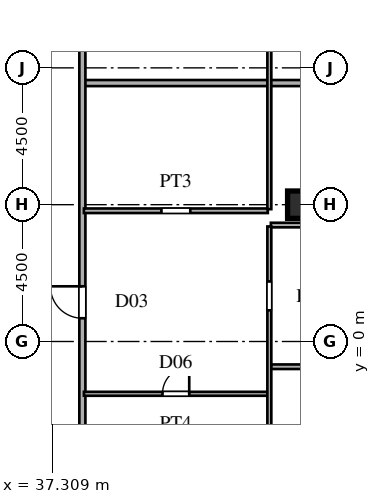
"""IFC4 building model, lengths in metres.
Left out: names, types, materials, properties, quantities, classifications, styles, units other than length and angle.
Written with IfcOpenShell. Run it as: python <this file> out.ifc"""

import sys

from ifc_helpers import new_model, si_unit, direction, frame, frame_2d, origin, origin_2d, place, context, subcontext, project, spatial, rectangle, i_section, extrude, source, transform, mapped, element, fill, save


model = new_model("IFC4")
c1 = context("Model", 3, precision=1e-05, world=origin(), true_north=direction((0.0, 1.0)))
c2 = subcontext(c1, "Body", "Model", "MODEL_VIEW")
j1 = project(units=[si_unit("LENGTHUNIT", "METRE"), si_unit("PLANEANGLEUNIT", "RADIAN")], contexts=[c1])
p1 = place(None, origin())
s1 = spatial("IfcSite", under=j1, at=p1, CompositionType="ELEMENT")
p2 = place(p1, origin())
s2 = spatial("IfcBuilding", under=s1, at=p2, CompositionType="ELEMENT")
p3 = place(p2, frame((0.0, 0.0, 54.9)))
s3 = spatial("IfcBuildingStorey", under=s2, at=p3, CompositionType="ELEMENT", Elevation=54.9)
m1 = source(origin(), c2, "Body", "SweptSolid", [
    extrude(i_section(OverallWidth=0.9, OverallDepth=0.9, WebThickness=0.036, FlangeThickness=0.055, at=origin_2d()), origin(), (0.0, 0.0, 1.0), 3.6),
])
p4 = place(p3, frame((45.5, 4.5, 0.0), z_axis=(0.0, 0.0, 1.0), x_axis=(1.0, 0.0, 0.0)))
e1 = element("IfcColumn", 1, at=p4, inside=s3, PredefinedType="COLUMN", context=c2, shape_type="MappedRepresentation", body=[
    mapped(m1, transform((0.0, 0.0, 0.0), scale=1.0)),
])
p5 = place(p3, frame((38.35, -1.72, 0.0), z_axis=(0.0, 0.0, 1.0), x_axis=(1.0, 0.0, 0.0)))
e2 = element("IfcWall", 2, at=p5, inside=s3, PredefinedType="PARTITIONING", context=c2, shape_type="SweptSolid", body=[
    extrude(rectangle(XDim=6.05, YDim=0.13, at=frame_2d((3.025, 0.0))), origin(), (0.0, 0.0, 1.0), 3.38),
])
p6 = place(p5, frame((2.585, 0.0, 0.0)))
e3 = element("IfcOpeningElement", 3, at=p6, cuts=e2, PredefinedType="OPENING", context=c2, shape_type="SweptSolid", body=[
    extrude(rectangle(XDim=0.88, YDim=2.1, at=frame_2d((0.44, 1.05))), frame((0.0, 0.075, 0.0), z_axis=(0.0, -1.0, 0.0), x_axis=(1.0, 0.0, 0.0)), (0.0, 0.0, 1.0), 0.15),
])
p7 = place(p3, frame((44.5, -0.83, 0.0), z_axis=(0.0, 0.0, 1.0), x_axis=(1.0, 0.0, 0.0)))
e4 = element("IfcWall", 4, at=p7, inside=s3, PredefinedType="PARTITIONING", context=c2, shape_type="SweptSolid", body=[
    extrude(rectangle(XDim=28.035, YDim=0.15, at=frame_2d((14.018, 0.0))), origin(), (0.0, 0.0, 1.0), 3.38),
])
p8 = place(p7, frame((4.5, 0.0, 0.0)))
e5 = element("IfcOpeningElement", 5, at=p8, cuts=e4, PredefinedType="OPENING", context=c2, shape_type="SweptSolid", body=[
    extrude(rectangle(XDim=0.95, YDim=2.15, at=frame_2d((0.475, 1.075))), frame((0.0, 0.085, 0.0), z_axis=(0.0, -1.0, 0.0), x_axis=(1.0, 0.0, 0.0)), (0.0, 0.0, 1.0), 0.17),
])
p9 = place(p7, frame((12.375, 0.0, 0.0)))
e6 = element("IfcOpeningElement", 6, at=p9, cuts=e4, PredefinedType="OPENING", context=c2, shape_type="SweptSolid", body=[
    extrude(rectangle(XDim=0.95, YDim=2.15, at=frame_2d((0.475, 1.075))), frame((0.0, 0.085, 0.0), z_axis=(0.0, -1.0, 0.0), x_axis=(1.0, 0.0, 0.0)), (0.0, 0.0, 1.0), 0.17),
])
p10 = place(p3, frame((44.5, 3.83, 0.0), z_axis=(0.0, 0.0, 1.0), x_axis=(1.0, 0.0, 0.0)))
e7 = element("IfcWall", 7, at=p10, inside=s3, PredefinedType="PARTITIONING", context=c2, shape_type="SweptSolid", body=[
    extrude(rectangle(XDim=28.035, YDim=0.15, at=frame_2d((14.018, 0.0))), origin(), (0.0, 0.0, 1.0), 3.38),
])
p11 = place(p10, frame((4.5, 0.0, 0.0)))
e8 = element("IfcOpeningElement", 8, at=p11, cuts=e7, PredefinedType="OPENING", context=c2, shape_type="SweptSolid", body=[
    extrude(rectangle(XDim=0.95, YDim=2.15, at=frame_2d((0.475, 1.075))), frame((0.0, 0.085, 0.0), z_axis=(0.0, -1.0, 0.0), x_axis=(1.0, 0.0, 0.0)), (0.0, 0.0, 1.0), 0.17),
])
p12 = place(p10, frame((12.375, 0.0, 0.0)))
e9 = element("IfcOpeningElement", 9, at=p12, cuts=e7, PredefinedType="OPENING", context=c2, shape_type="SweptSolid", body=[
    extrude(rectangle(XDim=0.95, YDim=2.15, at=frame_2d((0.475, 1.075))), frame((0.0, 0.085, 0.0), z_axis=(0.0, -1.0, 0.0), x_axis=(1.0, 0.0, 0.0)), (0.0, 0.0, 1.0), 0.17),
])
p13 = place(p3, frame((38.35, 4.3, 0.0), z_axis=(0.0, 0.0, 1.0), x_axis=(1.0, 0.0, 0.0)))
e10 = element("IfcWall", 10, at=p13, inside=s3, PredefinedType="PARTITIONING", context=c2, shape_type="SweptSolid", body=[
    extrude(rectangle(XDim=6.05, YDim=0.15, at=frame_2d((3.025, 0.0))), origin(), (0.0, 0.0, 1.0), 3.38),
])
p14 = place(p13, frame((2.55, 0.0, 0.0)))
e11 = element("IfcOpeningElement", 11, at=p14, cuts=e10, PredefinedType="OPENING", context=c2, shape_type="SweptSolid", body=[
    extrude(rectangle(XDim=0.95, YDim=2.15, at=frame_2d((0.475, 1.075))), frame((0.0, 0.085, 0.0), z_axis=(0.0, -1.0, 0.0), x_axis=(1.0, 0.0, 0.0)), (0.0, 0.0, 1.0), 0.17),
])
p15 = place(p3, frame((38.38, 8.5, 0.0), z_axis=(0.0, 0.0, 1.0), x_axis=(1.0, 0.0, 0.0)))
e12 = element("IfcWall", 12, at=p15, inside=s3, PredefinedType="PARTITIONING", context=c2, shape_type="SweptSolid", body=[
    extrude(rectangle(XDim=34.125, YDim=0.2, at=frame_2d((17.062, 0.0))), origin(), (0.0, 0.0, 1.0), 3.38),
])
p16 = place(p3, frame((38.3, -15.515, 0.0), z_axis=(0.0, 0.0, 1.0), x_axis=(0.0, 1.0, 0.0)))
e13 = element("IfcWall", 13, at=p16, inside=s3, PredefinedType="PARTITIONING", context=c2, shape_type="SweptSolid", body=[
    extrude(rectangle(XDim=31.03, YDim=0.2, at=frame_2d((15.515, 0.0))), origin(), (0.0, 0.0, 1.0), 3.38),
])
p17 = place(p16, frame((4.413, 0.0, 0.0)))
e14 = element("IfcOpeningElement", 14, at=p17, cuts=e13, PredefinedType="OPENING", context=c2, shape_type="SweptSolid", body=[
    extrude(rectangle(XDim=1.05, YDim=2.25, at=frame_2d((0.525, 1.125))), frame((0.0, 0.11, 0.0), z_axis=(0.0, -1.0, 0.0), x_axis=(1.0, 0.0, 0.0)), (0.0, 0.0, 1.0), 0.22),
])
p18 = place(p16, frame((16.28, 0.0, 0.0)))
e15 = element("IfcOpeningElement", 15, at=p18, cuts=e13, PredefinedType="OPENING", context=c2, shape_type="SweptSolid", body=[
    extrude(rectangle(XDim=1.05, YDim=2.25, at=frame_2d((0.525, 1.125))), frame((0.0, 0.11, 0.0), z_axis=(0.0, -1.0, 0.0), x_axis=(1.0, 0.0, 0.0)), (0.0, 0.0, 1.0), 0.22),
])
p19 = place(p16, frame((27.635, 0.0, 0.0)))
e16 = element("IfcOpeningElement", 16, at=p19, cuts=e13, PredefinedType="OPENING", context=c2, shape_type="SweptSolid", body=[
    extrude(rectangle(XDim=1.05, YDim=2.25, at=frame_2d((0.525, 1.125))), frame((0.0, 0.11, 0.0), z_axis=(0.0, -1.0, 0.0), x_axis=(1.0, 0.0, 0.0)), (0.0, 0.0, 1.0), 0.22),
])
p20 = place(p3, frame((44.45, -21.389, 0.0), z_axis=(0.0, 0.0, 1.0), x_axis=(0.0, 1.0, 0.0)))
e17 = element("IfcWall", 17, at=p20, inside=s3, PredefinedType="PARTITIONING", context=c2, shape_type="SweptSolid", body=[
    extrude(rectangle(XDim=25.172, YDim=0.13, at=frame_2d((12.586, 0.0))), origin(), (0.0, 0.0, 1.0), 3.38),
])
p21 = place(p20, frame((10.983, 0.0, 0.0)))
e18 = element("IfcOpeningElement", 18, at=p21, cuts=e17, PredefinedType="OPENING", context=c2, shape_type="SweptSolid", body=[
    extrude(rectangle(XDim=0.95, YDim=2.15, at=frame_2d((0.475, 1.075))), frame((0.0, 0.075, 0.0), z_axis=(0.0, -1.0, 0.0), x_axis=(1.0, 0.0, 0.0)), (0.0, 0.0, 1.0), 0.15),
])
p22 = place(p20, frame((9.483, 0.0, 0.0)))
e19 = element("IfcOpeningElement", 19, at=p22, cuts=e17, PredefinedType="OPENING", context=c2, shape_type="SweptSolid", body=[
    extrude(rectangle(XDim=0.95, YDim=2.15, at=frame_2d((0.475, 1.075))), frame((0.0, 0.075, 0.0), z_axis=(0.0, -1.0, 0.0), x_axis=(1.0, 0.0, 0.0)), (0.0, 0.0, 1.0), 0.15),
])
p23 = place(p20, frame((22.414, 0.0, 0.0)))
e20 = element("IfcOpeningElement", 20, at=p23, cuts=e17, PredefinedType="OPENING", context=c2, shape_type="SweptSolid", body=[
    extrude(rectangle(XDim=0.95, YDim=2.15, at=frame_2d((0.475, 1.075))), frame((0.0, 0.075, 0.0), z_axis=(0.0, -1.0, 0.0), x_axis=(1.0, 0.0, 0.0)), (0.0, 0.0, 1.0), 0.15),
])
p24 = place(p3, frame((44.45, 4.352, 0.0), z_axis=(0.0, 0.0, 1.0), x_axis=(0.0, 1.0, 0.0)))
e21 = element("IfcWall", 21, at=p24, inside=s3, PredefinedType="PARTITIONING", context=c2, shape_type="SweptSolid", body=[
    extrude(rectangle(XDim=17.037, YDim=0.13, at=frame_2d((8.519, 0.0))), origin(), (0.0, 0.0, 1.0), 3.38),
])
p25 = place(p24, frame((7.138, 0.0, 0.0)))
e22 = element("IfcOpeningElement", 22, at=p25, cuts=e21, PredefinedType="OPENING", context=c2, shape_type="SweptSolid", body=[
    extrude(rectangle(XDim=0.95, YDim=2.15, at=frame_2d((0.475, 1.075))), frame((0.0, 0.075, 0.0), z_axis=(0.0, -1.0, 0.0), x_axis=(1.0, 0.0, 0.0)), (0.0, 0.0, 1.0), 0.15),
])
p26 = place(p24, frame((15.352, 0.0, 0.0)))
e23 = element("IfcOpeningElement", 23, at=p26, cuts=e21, PredefinedType="OPENING", context=c2, shape_type="SweptSolid", body=[
    extrude(rectangle(XDim=0.95, YDim=2.15, at=frame_2d((0.475, 1.075))), frame((0.0, 0.075, 0.0), z_axis=(0.0, -1.0, 0.0), x_axis=(1.0, 0.0, 0.0)), (0.0, 0.0, 1.0), 0.15),
])
m2 = source(origin(), c2, "Body", "SweptSolid", [
    extrude(rectangle(XDim=0.88, YDim=2.1, at=frame_2d((0.44, 1.05))), frame((0.0, 0.025, 0.0), z_axis=(0.0, -1.0, 0.0), x_axis=(1.0, 0.0, 0.0)), (0.0, 0.0, 1.0), 0.05),
])
p27 = place(p6, origin())
e24 = element("IfcDoor", 24, at=p27, inside=s3, OperationType="SINGLE_SWING_RIGHT", PredefinedType="DOOR", context=c2, shape_type="MappedRepresentation", body=[
    mapped(m2, transform((0.0, 0.0, 0.0), scale=1.0)),
])
fill(e3, e24)
m3 = source(origin(), c2, "Body", "SweptSolid", [
    extrude(rectangle(XDim=1.05, YDim=2.25, at=frame_2d((0.525, 1.125))), frame((0.0, 0.025, 0.0), z_axis=(0.0, -1.0, 0.0), x_axis=(1.0, 0.0, 0.0)), (0.0, 0.0, 1.0), 0.05),
])
p28 = place(p18, origin())
e25 = element("IfcDoor", 25, at=p28, inside=s3, OperationType="SINGLE_SWING_RIGHT", PredefinedType="DOOR", context=c2, shape_type="MappedRepresentation", body=[
    mapped(m3, transform((0.0, 0.0, 0.0), scale=1.0)),
])
fill(e15, e25)
save(model, sys.argv[1])
